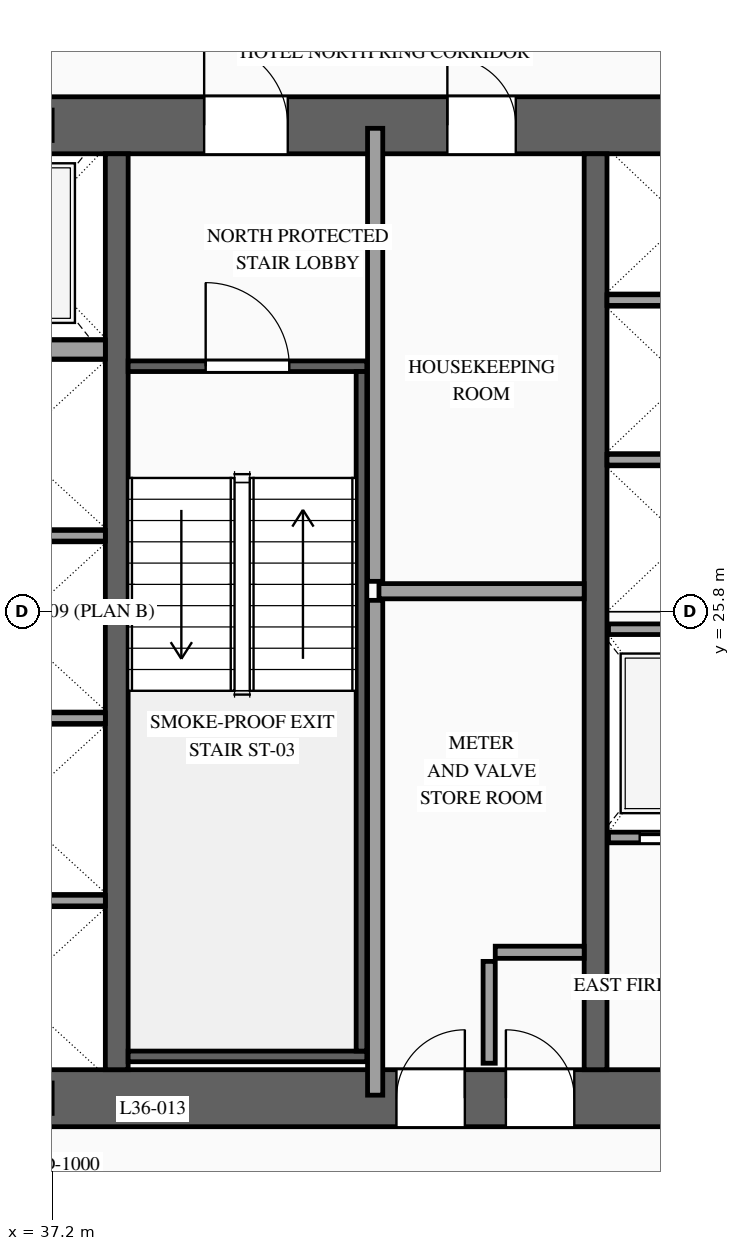
"""IFC4 building model, lengths in metres.
Left out: names, types, materials, properties, quantities, classifications, styles, units other than length and angle.
Written with IfcOpenShell. Run it as: python <this file> out.ifc"""

import sys

from ifc_helpers import new_model, si_unit, direction, frame, frame_2d, origin, place, context, subcontext, project, spatial, rectangle, extrude, source, transform, mapped, element, fill, save


model = new_model("IFC4")
c1 = context("Model", 3, precision=1e-05, world=origin(), true_north=direction((0.0, 1.0)))
c2 = subcontext(c1, "Body", "Model", "MODEL_VIEW")
j1 = project(units=[si_unit("LENGTHUNIT", "METRE"), si_unit("PLANEANGLEUNIT", "RADIAN")], contexts=[c1])
p1 = place(None, origin())
s1 = spatial("IfcSite", under=j1, at=p1, CompositionType="ELEMENT")
p2 = place(p1, origin())
s2 = spatial("IfcBuilding", under=s1, at=p2, CompositionType="ELEMENT")
p3 = place(p2, frame((0.0, 0.0, 138.0)))
s3 = spatial("IfcBuildingStorey", under=s2, at=p3, CompositionType="ELEMENT", Elevation=138.0)
p4 = place(p3, frame((23.425, 19.4, 0.0), z_axis=(0.0, 0.0, 1.0), x_axis=(1.0, 0.0, 0.0)))
e1 = element("IfcWall", 1, at=p4, inside=s3, PredefinedType="SHEAR", context=c2, shape_type="SweptSolid", body=[
    extrude(rectangle(XDim=27.15, YDim=0.75, at=frame_2d((13.575, 0.0))), origin(), (0.0, 0.0, 1.0), 3.6),
])
p5 = place(p4, frame((2.025, 0.0, 0.0)))
e2 = element("IfcOpeningElement", 2, at=p5, cuts=e1, PredefinedType="OPENING", context=c2, shape_type="SweptSolid", body=[
    extrude(rectangle(XDim=1.1, YDim=2.2, at=frame_2d((0.55, 1.1))), frame((0.0, 0.39, 0.0), z_axis=(0.0, -1.0, 0.0), x_axis=(1.0, 0.0, 0.0)), (0.0, 0.0, 1.0), 0.78),
])
p6 = place(p4, frame((9.925, 0.0, 0.0)))
e3 = element("IfcOpeningElement", 3, at=p6, cuts=e1, PredefinedType="OPENING", context=c2, shape_type="SweptSolid", body=[
    extrude(rectangle(XDim=1.1, YDim=2.2, at=frame_2d((0.55, 1.1))), frame((0.0, 0.39, 0.0), z_axis=(0.0, -1.0, 0.0), x_axis=(1.0, 0.0, 0.0)), (0.0, 0.0, 1.0), 0.78),
])
p7 = place(p4, frame((23.125, 0.0, 0.0)))
e4 = element("IfcOpeningElement", 4, at=p7, cuts=e1, PredefinedType="OPENING", context=c2, shape_type="SweptSolid", body=[
    extrude(rectangle(XDim=1.1, YDim=2.2, at=frame_2d((0.55, 1.1))), frame((0.0, 0.39, 0.0), z_axis=(0.0, -1.0, 0.0), x_axis=(1.0, 0.0, 0.0)), (0.0, 0.0, 1.0), 0.78),
])
p8 = place(p4, frame((19.745, 0.0, 0.0)))
e5 = element("IfcOpeningElement", 5, at=p8, cuts=e1, PredefinedType="OPENING", context=c2, shape_type="SweptSolid", body=[
    extrude(rectangle(XDim=0.9, YDim=2.15, at=frame_2d((0.45, 1.075))), frame((0.0, 0.39, 0.0), z_axis=(0.0, -1.0, 0.0), x_axis=(1.0, 0.0, 0.0)), (0.0, 0.0, 1.0), 0.78),
])
p9 = place(p4, frame((18.305, 0.0, 0.0)))
e6 = element("IfcOpeningElement", 6, at=p9, cuts=e1, PredefinedType="OPENING", context=c2, shape_type="SweptSolid", body=[
    extrude(rectangle(XDim=0.9, YDim=2.15, at=frame_2d((0.45, 1.075))), frame((0.0, 0.39, 0.0), z_axis=(0.0, -1.0, 0.0), x_axis=(1.0, 0.0, 0.0)), (0.0, 0.0, 1.0), 0.78),
])
p10 = place(p3, frame((23.425, 32.2, 0.0), z_axis=(0.0, 0.0, 1.0), x_axis=(1.0, 0.0, 0.0)))
e7 = element("IfcWall", 7, at=p10, inside=s3, PredefinedType="SHEAR", context=c2, shape_type="SweptSolid", body=[
    extrude(rectangle(XDim=27.15, YDim=0.75, at=frame_2d((13.575, 0.0))), origin(), (0.0, 0.0, 1.0), 3.6),
])
p11 = place(p10, frame((4.645, 0.0, 0.0)))
e8 = element("IfcOpeningElement", 8, at=p11, cuts=e7, PredefinedType="OPENING", context=c2, shape_type="SweptSolid", body=[
    extrude(rectangle(XDim=0.9, YDim=2.15, at=frame_2d((0.45, 1.075))), frame((0.0, 0.39, 0.0), z_axis=(0.0, -1.0, 0.0), x_axis=(1.0, 0.0, 0.0)), (0.0, 0.0, 1.0), 0.78),
])
p12 = place(p10, frame((9.925, 0.0, 0.0)))
e9 = element("IfcOpeningElement", 9, at=p12, cuts=e7, PredefinedType="OPENING", context=c2, shape_type="SweptSolid", body=[
    extrude(rectangle(XDim=1.1, YDim=2.2, at=frame_2d((0.55, 1.1))), frame((0.0, 0.39, 0.0), z_axis=(0.0, -1.0, 0.0), x_axis=(1.0, 0.0, 0.0)), (0.0, 0.0, 1.0), 0.78),
])
p13 = place(p10, frame((15.775, 0.0, 0.0)))
e10 = element("IfcOpeningElement", 10, at=p13, cuts=e7, PredefinedType="OPENING", context=c2, shape_type="SweptSolid", body=[
    extrude(rectangle(XDim=1.1, YDim=2.2, at=frame_2d((0.55, 1.1))), frame((0.0, 0.39, 0.0), z_axis=(0.0, -1.0, 0.0), x_axis=(1.0, 0.0, 0.0)), (0.0, 0.0, 1.0), 0.78),
])
p14 = place(p10, frame((18.975, 0.0, 0.0)))
e11 = element("IfcOpeningElement", 11, at=p14, cuts=e7, PredefinedType="OPENING", context=c2, shape_type="SweptSolid", body=[
    extrude(rectangle(XDim=0.9, YDim=2.15, at=frame_2d((0.45, 1.075))), frame((0.0, 0.39, 0.0), z_axis=(0.0, -1.0, 0.0), x_axis=(1.0, 0.0, 0.0)), (0.0, 0.0, 1.0), 0.78),
])
m1 = source(origin(), c2, "Body", "SweptSolid", [
    extrude(rectangle(XDim=12.05, YDim=0.3, at=frame_2d((6.025, 0.0))), origin(), (0.0, 0.0, 1.0), 3.6),
])
for number, where, z_axis, x_axis in (
    (12, (38.05, 19.775, 0.0), (0.0, 0.0, 1.0), (0.0, 1.0, 0.0)),
    (13, (44.35, 19.775, 0.0), (0.0, 0.0, 1.0), (0.0, 1.0, 0.0)),
):
    element("IfcWall", number, at=place(p3, frame(where, z_axis=z_axis, x_axis=x_axis)), inside=s3, PredefinedType="SOLIDWALL", context=c2, shape_type="MappedRepresentation", body=[
        mapped(m1, transform((0.0, 0.0, 0.0), scale=1.0)),
    ])
p15 = place(p3, frame((44.52, 22.83, 0.0), z_axis=(0.0, 0.0, 1.0), x_axis=(1.0, 0.0, 0.0)))
e14 = element("IfcWall", 14, at=p15, inside=s3, PredefinedType="SOLIDWALL", context=c2, shape_type="SweptSolid", body=[
    extrude(rectangle(XDim=1.92, YDim=0.14, at=frame_2d((0.96, 0.0))), origin(), (0.0, 0.0, 1.0), 3.38),
])
p16 = place(p15, frame((0.41, 0.0, 0.0)))
e15 = element("IfcOpeningElement", 15, at=p16, cuts=e14, PredefinedType="OPENING", context=c2, shape_type="SweptSolid", body=[
    extrude(rectangle(XDim=1.1, YDim=2.2, at=frame_2d((0.55, 1.1))), frame((0.0, 0.085, 0.0), z_axis=(0.0, -1.0, 0.0), x_axis=(1.0, 0.0, 0.0)), (0.0, 0.0, 1.0), 0.17),
])
m2 = source(origin(), c2, "Body", "SweptSolid", [
    extrude(rectangle(XDim=1.92, YDim=0.14, at=frame_2d((0.96, 0.0))), origin(), (0.0, 0.0, 1.0), 3.38),
])
p17 = place(p3, frame((44.52, 25.57, 0.0), z_axis=(0.0, 0.0, 1.0), x_axis=(1.0, 0.0, 0.0)))
e16 = element("IfcWall", 16, at=p17, inside=s3, PredefinedType="SOLIDWALL", context=c2, shape_type="MappedRepresentation", body=[
    mapped(m2, transform((0.0, 0.0, 0.0), scale=1.0)),
])
m3 = source(origin(), c2, "Body", "SweptSolid", [
    extrude(rectangle(XDim=2.4, YDim=0.14, at=frame_2d((1.2, 0.0))), origin(), (0.0, 0.0, 1.0), 3.38),
])
for number, where, z_axis, x_axis in (
    (17, (35.5, 22.0, 0.0), (0.0, 0.0, 1.0), (1.0, 0.0, 0.0)),
    (18, (35.5, 24.4, 0.0), (0.0, 0.0, 1.0), (1.0, 0.0, 0.0)),
    (19, (35.5, 26.8, 0.0), (0.0, 0.0, 1.0), (1.0, 0.0, 0.0)),
):
    element("IfcWall", number, at=place(p3, frame(where, z_axis=z_axis, x_axis=x_axis)), inside=s3, PredefinedType="SOLIDWALL", context=c2, shape_type="MappedRepresentation", body=[
        mapped(m3, transform((0.0, 0.0, 0.0), scale=1.0)),
    ])
m4 = source(origin(), c2, "Body", "SweptSolid", [
    extrude(rectangle(XDim=2.4, YDim=0.25, at=frame_2d((1.2, 0.0))), origin(), (0.0, 0.0, 1.0), 3.38),
])
p18 = place(p3, frame((35.5, 29.25, 0.0), z_axis=(0.0, 0.0, 1.0), x_axis=(1.0, 0.0, 0.0)))
e20 = element("IfcWall", 20, at=p18, inside=s3, PredefinedType="SOLIDWALL", context=c2, shape_type="MappedRepresentation", body=[
    mapped(m4, transform((0.0, 0.0, 0.0), scale=1.0)),
])
m5 = source(origin(), c2, "Body", "SweptSolid", [
    extrude(rectangle(XDim=2.0, YDim=0.14, at=frame_2d((1.0, 0.0))), origin(), (0.0, 0.0, 1.0), 3.38),
])
for number, where, z_axis, x_axis in (
    (21, (44.5, 27.8, 0.0), (0.0, 0.0, 1.0), (1.0, 0.0, 0.0)),
    (22, (44.5, 29.9, 0.0), (0.0, 0.0, 1.0), (1.0, 0.0, 0.0)),
):
    element("IfcWall", number, at=place(p3, frame(where, z_axis=z_axis, x_axis=x_axis)), inside=s3, PredefinedType="SOLIDWALL", context=c2, shape_type="MappedRepresentation", body=[
        mapped(m5, transform((0.0, 0.0, 0.0), scale=1.0)),
    ])
p19 = place(p3, frame((38.2, 29.03, 0.0), z_axis=(0.0, 0.0, 1.0), x_axis=(1.0, 0.0, 0.0)))
e23 = element("IfcWall", 23, at=p19, inside=s3, PredefinedType="SOLIDWALL", context=c2, shape_type="SweptSolid", body=[
    extrude(rectangle(XDim=3.14, YDim=0.14, at=frame_2d((1.57, 0.0))), origin(), (0.0, 0.0, 1.0), 3.38),
])
p20 = place(p19, frame((1.02, 0.0, 0.0)))
e24 = element("IfcOpeningElement", 24, at=p20, cuts=e23, PredefinedType="OPENING", context=c2, shape_type="SweptSolid", body=[
    extrude(rectangle(XDim=1.1, YDim=2.2, at=frame_2d((0.55, 1.1))), frame((0.0, 0.085, 0.0), z_axis=(0.0, -1.0, 0.0), x_axis=(1.0, 0.0, 0.0)), (0.0, 0.0, 1.0), 0.17),
])
m6 = source(origin(), c2, "Body", "SweptSolid", [
    extrude(rectangle(XDim=3.14, YDim=0.14, at=frame_2d((1.57, 0.0))), origin(), (0.0, 0.0, 1.0), 3.38),
])
p21 = place(p3, frame((38.2, 19.95, 0.0), z_axis=(0.0, 0.0, 1.0), x_axis=(1.0, 0.0, 0.0)))
e25 = element("IfcWall", 25, at=p21, inside=s3, PredefinedType="SOLIDWALL", context=c2, shape_type="MappedRepresentation", body=[
    mapped(m6, transform((0.0, 0.0, 0.0), scale=1.0)),
])
m7 = source(origin(), c2, "Body", "SweptSolid", [
    extrude(rectangle(XDim=8.94, YDim=0.14, at=frame_2d((4.47, 0.0))), origin(), (0.0, 0.0, 1.0), 3.38),
])
p22 = place(p3, frame((41.27, 20.02, 0.0), z_axis=(0.0, 0.0, 1.0), x_axis=(0.0, 1.0, 0.0)))
e26 = element("IfcWall", 26, at=p22, inside=s3, PredefinedType="SOLIDWALL", context=c2, shape_type="MappedRepresentation", body=[
    mapped(m7, transform((0.0, 0.0, 0.0), scale=1.0)),
])
m8 = source(origin(), c2, "Body", "SweptSolid", [
    extrude(rectangle(XDim=1.34, YDim=0.16, at=frame_2d((0.67, 0.0))), origin(), (0.0, 0.0, 1.0), 3.38),
])
p23 = place(p3, frame((42.95, 19.86, 0.0), z_axis=(0.0, 0.0, 1.0), x_axis=(0.0, 1.0, 0.0)))
e27 = element("IfcWall", 27, at=p23, inside=s3, PredefinedType="PARTITIONING", context=c2, shape_type="MappedRepresentation", body=[
    mapped(m8, transform((0.0, 0.0, 0.0), scale=1.0)),
])
m9 = source(origin(), c2, "Body", "SweptSolid", [
    extrude(rectangle(XDim=1.17, YDim=0.16, at=frame_2d((0.585, 0.0))), origin(), (0.0, 0.0, 1.0), 3.38),
])
p24 = place(p3, frame((43.03, 21.32, 0.0), z_axis=(0.0, 0.0, 1.0), x_axis=(1.0, 0.0, 0.0)))
e28 = element("IfcWall", 28, at=p24, inside=s3, PredefinedType="PARTITIONING", context=c2, shape_type="MappedRepresentation", body=[
    mapped(m9, transform((0.0, 0.0, 0.0), scale=1.0)),
])
m10 = source(origin(), c2, "Body", "SweptSolid", [
    extrude(rectangle(XDim=6.51, YDim=0.2, at=frame_2d((3.255, 0.0))), origin(), (0.0, 0.0, 1.0), 3.38),
])
p25 = place(p3, frame((41.45, 19.44, 0.0), z_axis=(0.0, 0.0, 1.0), x_axis=(0.0, 1.0, 0.0)))
e29 = element("IfcWall", 29, at=p25, inside=s3, PredefinedType="PARTITIONING", context=c2, shape_type="MappedRepresentation", body=[
    mapped(m10, transform((0.0, 0.0, 0.0), scale=1.0)),
])
m11 = source(origin(), c2, "Body", "SweptSolid", [
    extrude(rectangle(XDim=2.7, YDim=0.2, at=frame_2d((1.35, 0.0))), origin(), (0.0, 0.0, 1.0), 3.38),
])
p26 = place(p3, frame((41.5, 26.07, 0.0), z_axis=(0.0, 0.0, 1.0), x_axis=(1.0, 0.0, 0.0)))
e30 = element("IfcWall", 30, at=p26, inside=s3, PredefinedType="PARTITIONING", context=c2, shape_type="MappedRepresentation", body=[
    mapped(m11, transform((0.0, 0.0, 0.0), scale=1.0)),
])
m12 = source(origin(), c2, "Body", "SweptSolid", [
    extrude(rectangle(XDim=5.96, YDim=0.2, at=frame_2d((2.98, 0.0))), origin(), (0.0, 0.0, 1.0), 3.38),
])
p27 = place(p3, frame((41.45, 26.2, 0.0), z_axis=(0.0, 0.0, 1.0), x_axis=(0.0, 1.0, 0.0)))
e31 = element("IfcWall", 31, at=p27, inside=s3, PredefinedType="PARTITIONING", context=c2, shape_type="MappedRepresentation", body=[
    mapped(m12, transform((0.0, 0.0, 0.0), scale=1.0)),
])
m13 = source(origin(), c2, "Body", "SweptSolid", [
    extrude(rectangle(XDim=1.1, YDim=2.2, at=frame_2d((0.55, 1.1))), frame((0.0, 0.025, 0.0), z_axis=(0.0, -1.0, 0.0), x_axis=(1.0, 0.0, 0.0)), (0.0, 0.0, 1.0), 0.05),
])
p28 = place(p16, origin())
e32 = element("IfcDoor", 32, at=p28, inside=s3, OperationType="SLIDING_TO_RIGHT", PredefinedType="DOOR", context=c2, shape_type="MappedRepresentation", body=[
    mapped(m13, transform((0.0, 0.0, 0.0), scale=1.0)),
])
fill(e15, e32)
m14 = source(origin(), c2, "Body", "SweptSolid", [
    extrude(rectangle(XDim=1.1, YDim=2.2, at=frame_2d((0.55, 1.1))), frame((0.0, 0.025, 0.0), z_axis=(0.0, -1.0, 0.0), x_axis=(1.0, 0.0, 0.0)), (0.0, 0.0, 1.0), 0.05),
])
p29 = place(p20, origin())
e33 = element("IfcDoor", 33, at=p29, inside=s3, OperationType="SINGLE_SWING_LEFT", PredefinedType="DOOR", context=c2, shape_type="MappedRepresentation", body=[
    mapped(m14, transform((0.0, 0.0, 0.0), scale=1.0)),
])
fill(e24, e33)
p30 = place(p13, origin())
e34 = element("IfcDoor", 34, at=p30, inside=s3, OperationType="SINGLE_SWING_LEFT", PredefinedType="DOOR", context=c2, shape_type="MappedRepresentation", body=[
    mapped(m14, transform((0.0, 0.0, 0.0), scale=1.0)),
])
fill(e10, e34)
m15 = source(origin(), c2, "Body", "SweptSolid", [
    extrude(rectangle(XDim=0.9, YDim=2.15, at=frame_2d((0.45, 1.075))), frame((0.0, 0.025, 0.0), z_axis=(0.0, -1.0, 0.0), x_axis=(1.0, 0.0, 0.0)), (0.0, 0.0, 1.0), 0.05),
])
p31 = place(p8, origin())
e35 = element("IfcDoor", 35, at=p31, inside=s3, OperationType="SINGLE_SWING_LEFT", PredefinedType="DOOR", context=c2, shape_type="MappedRepresentation", body=[
    mapped(m15, transform((0.0, 0.0, 0.0), scale=1.0)),
])
fill(e5, e35)
p32 = place(p9, origin())
e36 = element("IfcDoor", 36, at=p32, inside=s3, OperationType="SINGLE_SWING_RIGHT", PredefinedType="DOOR", context=c2, shape_type="MappedRepresentation", body=[
    mapped(m15, transform((0.0, 0.0, 0.0), scale=1.0)),
])
fill(e6, e36)
p33 = place(p14, origin())
e37 = element("IfcDoor", 37, at=p33, inside=s3, OperationType="SINGLE_SWING_LEFT", PredefinedType="DOOR", context=c2, shape_type="MappedRepresentation", body=[
    mapped(m15, transform((0.0, 0.0, 0.0), scale=1.0)),
])
fill(e11, e37)
save(model, sys.argv[1])
